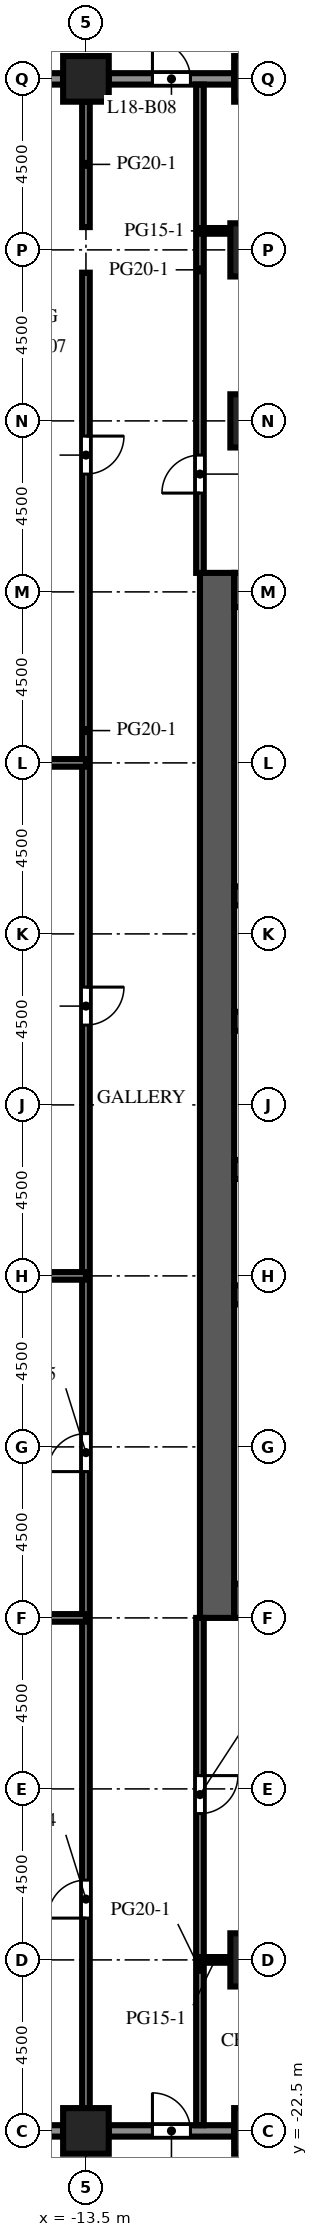
"""IFC4 building model, lengths in metres.
Left out: names, types, materials, properties, quantities, classifications, styles, units other than length and angle.
Written with IfcOpenShell. Run it as: python <this file> out.ifc"""

import sys

from ifc_helpers import new_model, si_unit, direction, frame, frame_2d, origin, origin_2d, place, context, subcontext, project, spatial, rectangle, extrude, element, fill, save


model = new_model("IFC4")
c1 = context("Model", 3, precision=1e-05, world=origin(), true_north=direction((0.0, 1.0)))
c2 = subcontext(c1, "Body", "Model", "MODEL_VIEW")
j1 = project(units=[si_unit("LENGTHUNIT", "METRE"), si_unit("PLANEANGLEUNIT", "RADIAN")], contexts=[c1])
p1 = place(None, origin())
s1 = spatial("IfcSite", under=j1, at=p1, CompositionType="ELEMENT")
p2 = place(p1, origin())
s2 = spatial("IfcBuilding", under=s1, at=p2, CompositionType="ELEMENT")
p3 = place(p2, frame((0.0, 0.0, 82.0)))
s3 = spatial("IfcBuildingStorey", under=s2, at=p3, CompositionType="ELEMENT", Elevation=82.0)
p4 = place(p3, frame((-13.5, -22.5, 0.0), z_axis=(0.0, 0.0, 1.0), x_axis=(1.0, 0.0, 0.0)))
e1 = element("IfcColumn", 1, at=p4, inside=s3, PredefinedType="COLUMN", context=c2, shape_type="SweptSolid", body=[
    extrude(rectangle(XDim=1.2, YDim=1.2, at=origin_2d()), origin(), (0.0, 0.0, 1.0), 4.1),
])
p5 = place(p3, frame((-13.5, 31.5, -0.45), z_axis=(0.0, 0.0, 1.0), x_axis=(1.0, 0.0, 0.0)))
e2 = element("IfcColumn", 2, at=p5, inside=s3, PredefinedType="COLUMN", context=c2, shape_type="SweptSolid", body=[
    extrude(rectangle(XDim=1.2, YDim=1.2, at=origin_2d()), origin(), (0.0, 0.0, 1.0), 4.55),
])
p6 = place(p3, frame((-9.0, -22.5, 0.0), z_axis=(0.0, 0.0, 1.0), x_axis=(1.0, 0.0, 0.0)))
e3 = element("IfcColumn", 3, at=p6, inside=s3, PredefinedType="COLUMN", context=c2, shape_type="SweptSolid", body=[
    extrude(rectangle(XDim=1.2, YDim=1.2, at=origin_2d()), origin(), (0.0, 0.0, 1.0), 4.1),
])
p7 = place(p3, frame((-9.0, 31.5, -0.45), z_axis=(0.0, 0.0, 1.0), x_axis=(1.0, 0.0, 0.0)))
e4 = element("IfcColumn", 4, at=p7, inside=s3, PredefinedType="COLUMN", context=c2, shape_type="SweptSolid", body=[
    extrude(rectangle(XDim=1.2, YDim=1.2, at=origin_2d()), origin(), (0.0, 0.0, 1.0), 4.55),
])
p8 = place(p3, frame((-9.0, -18.0, 0.0), z_axis=(0.0, 0.0, 1.0), x_axis=(1.0, 0.0, 0.0)))
e5 = element("IfcColumn", 5, at=p8, inside=s3, PredefinedType="COLUMN", context=c2, shape_type="SweptSolid", body=[
    extrude(rectangle(XDim=1.4, YDim=1.4, at=origin_2d()), origin(), (0.0, 0.0, 1.0), 4.1),
])
for number, where, z_axis, x_axis in (
    (6, (-9.0, 22.5, -0.45), (0.0, 0.0, 1.0), (1.0, 0.0, 0.0)),
    (7, (-9.0, 27.0, -0.45), (0.0, 0.0, 1.0), (1.0, 0.0, 0.0)),
):
    element("IfcColumn", number, at=place(p3, frame(where, z_axis=z_axis, x_axis=x_axis)), inside=s3, PredefinedType="COLUMN", context=c2, shape_type="SweptSolid", body=[
        extrude(rectangle(XDim=1.4, YDim=1.4, at=origin_2d()), origin(), (0.0, 0.0, 1.0), 4.55),
    ])
p9 = place(p3, frame((-10.05, -9.0, 0.0), z_axis=(0.0, 0.0, 1.0), x_axis=(0.0, 1.0, 0.0)))
e8 = element("IfcWall", 8, at=p9, inside=s3, PredefinedType="SHEAR", context=c2, shape_type="SweptSolid", body=[
    extrude(rectangle(XDim=27.5, YDim=0.9, at=frame_2d((13.75, 0.0))), origin(), (0.0, 0.0, 1.0), 4.1),
])
p10 = place(p9, frame((12.55, 0.0, 0.0)))
e9 = element("IfcOpeningElement", 9, at=p10, cuts=e8, PredefinedType="OPENING", context=c2, shape_type="SweptSolid", body=[
    extrude(rectangle(XDim=2.4, YDim=2.4, at=frame_2d((1.2, 1.2))), frame((0.0, 0.46, 0.0), z_axis=(0.0, -1.0, 0.0), x_axis=(1.0, 0.0, 0.0)), (0.0, 0.0, 1.0), 0.92),
])
p11 = place(p9, frame((6.825, 0.0, 0.0)))
e10 = element("IfcOpeningElement", 10, at=p11, cuts=e8, PredefinedType="OPENING", context=c2, shape_type="SweptSolid", body=[
    extrude(rectangle(XDim=1.2, YDim=2.1, at=frame_2d((0.6, 1.05))), frame((0.0, 0.46, 0.0), z_axis=(0.0, -1.0, 0.0), x_axis=(1.0, 0.0, 0.0)), (0.0, 0.0, 1.0), 0.92),
])
p12 = place(p9, frame((19.475, 0.0, 0.0)))
e11 = element("IfcOpeningElement", 11, at=p12, cuts=e8, PredefinedType="OPENING", context=c2, shape_type="SweptSolid", body=[
    extrude(rectangle(XDim=1.2, YDim=2.1, at=frame_2d((0.6, 1.05))), frame((0.0, 0.46, 0.0), z_axis=(0.0, -1.0, 0.0), x_axis=(1.0, 0.0, 0.0)), (0.0, 0.0, 1.0), 0.92),
])
for number, where, z_axis, x_axis in (
    (12, (-9.6, -8.55, 0.0), (0.0, 0.0, 1.0), (1.0, 0.0, 0.0)),
    (13, (-9.6, 18.05, 0.0), (0.0, 0.0, 1.0), (1.0, 0.0, 0.0)),
):
    element("IfcWall", number, at=place(p3, frame(where, z_axis=z_axis, x_axis=x_axis)), inside=s3, PredefinedType="SHEAR", context=c2, shape_type="SweptSolid", body=[
        extrude(rectangle(XDim=10.2, YDim=0.9, at=frame_2d((5.1, 0.0))), origin(), (0.0, 0.0, 1.0), 4.1),
    ])
p13 = place(p3, frame((-9.6, -0.5, 0.0), z_axis=(0.0, 0.0, 1.0), x_axis=(1.0, 0.0, 0.0)))
e14 = element("IfcWall", 14, at=p13, inside=s3, PredefinedType="SHEAR", context=c2, shape_type="SweptSolid", body=[
    extrude(rectangle(XDim=10.2, YDim=0.5, at=frame_2d((5.1, 0.0))), origin(), (0.0, 0.0, 1.0), 4.1),
])
p14 = place(p3, frame((-9.6, 2.8, 0.0), z_axis=(0.0, 0.0, 1.0), x_axis=(1.0, 0.0, 0.0)))
e15 = element("IfcWall", 15, at=p14, inside=s3, PredefinedType="SHEAR", context=c2, shape_type="SweptSolid", body=[
    extrude(rectangle(XDim=10.2, YDim=0.5, at=frame_2d((5.1, 0.0))), origin(), (0.0, 0.0, 1.0), 4.1),
])
p15 = place(p14, frame((0.562, 0.0, 0.0)))
e16 = element("IfcOpeningElement", 16, at=p15, cuts=e15, PredefinedType="OPENING", context=c2, shape_type="SweptSolid", body=[
    extrude(rectangle(XDim=1.1, YDim=2.1, at=frame_2d((0.55, 1.05))), frame((0.0, 0.26, 0.0), z_axis=(0.0, -1.0, 0.0), x_axis=(1.0, 0.0, 0.0)), (0.0, 0.0, 1.0), 0.52),
])
p16 = place(p14, frame((3.238, 0.0, 0.0)))
e17 = element("IfcOpeningElement", 17, at=p16, cuts=e15, PredefinedType="OPENING", context=c2, shape_type="SweptSolid", body=[
    extrude(rectangle(XDim=1.1, YDim=2.1, at=frame_2d((0.55, 1.05))), frame((0.0, 0.26, 0.0), z_axis=(0.0, -1.0, 0.0), x_axis=(1.0, 0.0, 0.0)), (0.0, 0.0, 1.0), 0.52),
])
p17 = place(p14, frame((8.538, 0.0, 0.0)))
e18 = element("IfcOpeningElement", 18, at=p17, cuts=e15, PredefinedType="OPENING", context=c2, shape_type="SweptSolid", body=[
    extrude(rectangle(XDim=1.1, YDim=2.1, at=frame_2d((0.55, 1.05))), frame((0.0, 0.26, 0.0), z_axis=(0.0, -1.0, 0.0), x_axis=(1.0, 0.0, 0.0)), (0.0, 0.0, 1.0), 0.52),
])
p18 = place(p3, frame((-9.6, 6.7, 0.0), z_axis=(0.0, 0.0, 1.0), x_axis=(1.0, 0.0, 0.0)))
e19 = element("IfcWall", 19, at=p18, inside=s3, PredefinedType="SHEAR", context=c2, shape_type="SweptSolid", body=[
    extrude(rectangle(XDim=10.2, YDim=0.5, at=frame_2d((5.1, 0.0))), origin(), (0.0, 0.0, 1.0), 4.1),
])
p19 = place(p18, frame((0.562, 0.0, 0.0)))
e20 = element("IfcOpeningElement", 20, at=p19, cuts=e19, PredefinedType="OPENING", context=c2, shape_type="SweptSolid", body=[
    extrude(rectangle(XDim=1.1, YDim=2.1, at=frame_2d((0.55, 1.05))), frame((0.0, 0.26, 0.0), z_axis=(0.0, -1.0, 0.0), x_axis=(1.0, 0.0, 0.0)), (0.0, 0.0, 1.0), 0.52),
])
p20 = place(p18, frame((3.288, 0.0, 0.0)))
e21 = element("IfcOpeningElement", 21, at=p20, cuts=e19, PredefinedType="OPENING", context=c2, shape_type="SweptSolid", body=[
    extrude(rectangle(XDim=1.0, YDim=2.1, at=frame_2d((0.5, 1.05))), frame((0.0, 0.26, 0.0), z_axis=(0.0, -1.0, 0.0), x_axis=(1.0, 0.0, 0.0)), (0.0, 0.0, 1.0), 0.52),
])
p21 = place(p18, frame((5.913, 0.0, 0.0)))
e22 = element("IfcOpeningElement", 22, at=p21, cuts=e19, PredefinedType="OPENING", context=c2, shape_type="SweptSolid", body=[
    extrude(rectangle(XDim=1.0, YDim=2.1, at=frame_2d((0.5, 1.05))), frame((0.0, 0.26, 0.0), z_axis=(0.0, -1.0, 0.0), x_axis=(1.0, 0.0, 0.0)), (0.0, 0.0, 1.0), 0.52),
])
p22 = place(p18, frame((8.587, 0.0, 0.0)))
e23 = element("IfcOpeningElement", 23, at=p22, cuts=e19, PredefinedType="OPENING", context=c2, shape_type="SweptSolid", body=[
    extrude(rectangle(XDim=1.0, YDim=2.1, at=frame_2d((0.5, 1.05))), frame((0.0, 0.26, 0.0), z_axis=(0.0, -1.0, 0.0), x_axis=(1.0, 0.0, 0.0)), (0.0, 0.0, 1.0), 0.52),
])
p23 = place(p3, frame((-9.6, 10.0, 0.0), z_axis=(0.0, 0.0, 1.0), x_axis=(1.0, 0.0, 0.0)))
e24 = element("IfcWall", 24, at=p23, inside=s3, PredefinedType="SHEAR", context=c2, shape_type="SweptSolid", body=[
    extrude(rectangle(XDim=10.2, YDim=0.5, at=frame_2d((5.1, 0.0))), origin(), (0.0, 0.0, 1.0), 4.1),
])
p24 = place(p3, frame((-14.1, -22.5, 0.0), z_axis=(0.0, 0.0, 1.0), x_axis=(-1.0, 0.0, 0.0)))
e25 = element("IfcWall", 25, at=p24, inside=s3, PredefinedType="SOLIDWALL", context=c2, shape_type="SweptSolid", body=[
    extrude(rectangle(XDim=3.3, YDim=0.3, at=frame_2d((1.65, 0.0))), origin(), (0.0, 0.0, 1.0), 2.75),
])
p25 = place(p24, frame((0.45, 0.0, 0.8)))
e26 = element("IfcOpeningElement", 26, at=p25, cuts=e25, PredefinedType="OPENING", context=c2, shape_type="SweptSolid", body=[
    extrude(rectangle(XDim=2.4, YDim=1.7, at=frame_2d((1.2, 0.85))), frame((0.0, 0.16, 0.0), z_axis=(0.0, -1.0, 0.0), x_axis=(1.0, 0.0, 0.0)), (0.0, 0.0, 1.0), 0.32),
])
p26 = place(p3, frame((-9.6, -22.5, 0.0), z_axis=(0.0, 0.0, 1.0), x_axis=(-1.0, 0.0, 0.0)))
e27 = element("IfcWall", 27, at=p26, inside=s3, PredefinedType="SOLIDWALL", context=c2, shape_type="SweptSolid", body=[
    extrude(rectangle(XDim=3.3, YDim=0.3, at=frame_2d((1.65, 0.0))), origin(), (0.0, 0.0, 1.0), 2.75),
])
p27 = place(p26, frame((1.15, 0.0, 0.0)))
e28 = element("IfcOpeningElement", 28, at=p27, cuts=e27, PredefinedType="OPENING", context=c2, shape_type="SweptSolid", body=[
    extrude(rectangle(XDim=1.0, YDim=2.2, at=frame_2d((0.5, 1.1))), frame((0.0, 0.16, 0.0), z_axis=(0.0, -1.0, 0.0), x_axis=(1.0, 0.0, 0.0)), (0.0, 0.0, 1.0), 0.32),
])
p28 = place(p3, frame((-12.9, 31.5, 0.0), z_axis=(0.0, 0.0, 1.0), x_axis=(1.0, 0.0, 0.0)))
e29 = element("IfcWall", 29, at=p28, inside=s3, PredefinedType="SOLIDWALL", context=c2, shape_type="SweptSolid", body=[
    extrude(rectangle(XDim=3.3, YDim=0.3, at=frame_2d((1.65, 0.0))), origin(), (0.0, 0.0, 1.0), 2.75),
])
p29 = place(p28, frame((1.15, 0.0, 0.0)))
e30 = element("IfcOpeningElement", 30, at=p29, cuts=e29, PredefinedType="OPENING", context=c2, shape_type="SweptSolid", body=[
    extrude(rectangle(XDim=1.0, YDim=2.2, at=frame_2d((0.5, 1.1))), frame((0.0, 0.16, 0.0), z_axis=(0.0, -1.0, 0.0), x_axis=(1.0, 0.0, 0.0)), (0.0, 0.0, 1.0), 0.32),
])
p30 = place(p3, frame((-17.4, 31.5, 0.0), z_axis=(0.0, 0.0, 1.0), x_axis=(1.0, 0.0, 0.0)))
e31 = element("IfcWall", 31, at=p30, inside=s3, PredefinedType="SOLIDWALL", context=c2, shape_type="SweptSolid", body=[
    extrude(rectangle(XDim=3.3, YDim=0.3, at=frame_2d((1.65, 0.0))), origin(), (0.0, 0.0, 1.0), 2.75),
])
p31 = place(p30, frame((0.45, 0.0, 0.8)))
e32 = element("IfcOpeningElement", 32, at=p31, cuts=e31, PredefinedType="OPENING", context=c2, shape_type="SweptSolid", body=[
    extrude(rectangle(XDim=2.4, YDim=1.7, at=frame_2d((1.2, 0.85))), frame((0.0, 0.16, 0.0), z_axis=(0.0, -1.0, 0.0), x_axis=(1.0, 0.0, 0.0)), (0.0, 0.0, 1.0), 0.32),
])
p32 = place(p3, frame((-13.5, -21.9, 0.0), z_axis=(0.0, 0.0, 1.0), x_axis=(0.0, 1.0, 0.0)))
e33 = element("IfcWall", 33, at=p32, inside=s3, PredefinedType="PARTITIONING", context=c2, shape_type="SweptSolid", body=[
    extrude(rectangle(XDim=48.3, YDim=0.2, at=frame_2d((24.15, 0.0))), origin(), (0.0, 0.0, 1.0), 3.65),
])
p33 = place(p32, frame((5.0, 0.0, 0.0)))
e34 = element("IfcOpeningElement", 34, at=p33, cuts=e33, PredefinedType="OPENING", context=c2, shape_type="SweptSolid", body=[
    extrude(rectangle(XDim=1.0, YDim=2.1, at=frame_2d((0.5, 1.05))), frame((0.0, 0.11, 0.0), z_axis=(0.0, -1.0, 0.0), x_axis=(1.0, 0.0, 0.0)), (0.0, 0.0, 1.0), 0.22),
])
p34 = place(p32, frame((16.75, 0.0, 0.0)))
e35 = element("IfcOpeningElement", 35, at=p34, cuts=e33, PredefinedType="OPENING", context=c2, shape_type="SweptSolid", body=[
    extrude(rectangle(XDim=1.0, YDim=2.1, at=frame_2d((0.5, 1.05))), frame((0.0, 0.11, 0.0), z_axis=(0.0, -1.0, 0.0), x_axis=(1.0, 0.0, 0.0)), (0.0, 0.0, 1.0), 0.22),
])
p35 = place(p32, frame((28.5, 0.0, 0.0)))
e36 = element("IfcOpeningElement", 36, at=p35, cuts=e33, PredefinedType="OPENING", context=c2, shape_type="SweptSolid", body=[
    extrude(rectangle(XDim=1.0, YDim=2.1, at=frame_2d((0.5, 1.05))), frame((0.0, 0.11, 0.0), z_axis=(0.0, -1.0, 0.0), x_axis=(1.0, 0.0, 0.0)), (0.0, 0.0, 1.0), 0.22),
])
p36 = place(p32, frame((43.0, 0.0, 0.0)))
e37 = element("IfcOpeningElement", 37, at=p36, cuts=e33, PredefinedType="OPENING", context=c2, shape_type="SweptSolid", body=[
    extrude(rectangle(XDim=1.0, YDim=2.1, at=frame_2d((0.5, 1.05))), frame((0.0, 0.11, 0.0), z_axis=(0.0, -1.0, 0.0), x_axis=(1.0, 0.0, 0.0)), (0.0, 0.0, 1.0), 0.22),
])
p37 = place(p3, frame((-13.5, 27.6, 0.0), z_axis=(0.0, 0.0, 1.0), x_axis=(0.0, 1.0, 0.0)))
e38 = element("IfcWall", 38, at=p37, inside=s3, PredefinedType="PARTITIONING", context=c2, shape_type="SweptSolid", body=[
    extrude(rectangle(XDim=3.3, YDim=0.2, at=frame_2d((1.65, 0.0))), origin(), (0.0, 0.0, 1.0), 3.65),
])
p38 = place(p3, frame((-10.5, -9.0, 0.0), z_axis=(0.0, 0.0, 1.0), x_axis=(0.0, -1.0, 0.0)))
e39 = element("IfcWall", 39, at=p38, inside=s3, PredefinedType="PARTITIONING", context=c2, shape_type="SweptSolid", body=[
    extrude(rectangle(XDim=13.35, YDim=0.2, at=frame_2d((6.675, 0.0))), origin(), (0.0, 0.0, 1.0), 3.65),
])
p39 = place(p38, frame((4.15, 0.0, 0.0)))
e40 = element("IfcOpeningElement", 40, at=p39, cuts=e39, PredefinedType="OPENING", context=c2, shape_type="SweptSolid", body=[
    extrude(rectangle(XDim=1.0, YDim=2.1, at=frame_2d((0.5, 1.05))), frame((0.0, 0.11, 0.0), z_axis=(0.0, -1.0, 0.0), x_axis=(1.0, 0.0, 0.0)), (0.0, 0.0, 1.0), 0.22),
])
p40 = place(p3, frame((-10.5, 31.35, 0.0), z_axis=(0.0, 0.0, 1.0), x_axis=(0.0, -1.0, 0.0)))
e41 = element("IfcWall", 41, at=p40, inside=s3, PredefinedType="PARTITIONING", context=c2, shape_type="SweptSolid", body=[
    extrude(rectangle(XDim=12.85, YDim=0.2, at=frame_2d((6.425, 0.0))), origin(), (0.0, 0.0, 1.0), 3.65),
])
p41 = place(p40, frame((9.75, 0.0, 0.0)))
e42 = element("IfcOpeningElement", 42, at=p41, cuts=e41, PredefinedType="OPENING", context=c2, shape_type="SweptSolid", body=[
    extrude(rectangle(XDim=1.0, YDim=2.1, at=frame_2d((0.5, 1.05))), frame((0.0, 0.11, 0.0), z_axis=(0.0, -1.0, 0.0), x_axis=(1.0, 0.0, 0.0)), (0.0, 0.0, 1.0), 0.22),
])
p42 = place(p3, frame((-10.5, -18.0, 0.0), z_axis=(0.0, 0.0, 1.0), x_axis=(1.0, 0.0, 0.0)))
e43 = element("IfcWall", 43, at=p42, inside=s3, PredefinedType="PARTITIONING", context=c2, shape_type="SweptSolid", body=[
    extrude(rectangle(XDim=0.8, YDim=0.15, at=frame_2d((0.4, 0.0))), origin(), (0.0, 0.0, 1.0), 3.65),
])
for number, where, z_axis, x_axis in (
    (44, (-17.3, -9.0, 0.0), (0.0, 0.0, 1.0), (1.0, 0.0, 0.0)),
    (45, (-17.3, 0.0, 0.0), (0.0, 0.0, 1.0), (1.0, 0.0, 0.0)),
):
    element("IfcWall", number, at=place(p3, frame(where, z_axis=z_axis, x_axis=x_axis)), inside=s3, PredefinedType="PARTITIONING", context=c2, shape_type="SweptSolid", body=[
        extrude(rectangle(XDim=3.8, YDim=0.2, at=frame_2d((1.9, 0.0))), origin(), (0.0, 0.0, 1.0), 3.65),
    ])
p43 = place(p3, frame((-21.9, 13.5, 0.0), z_axis=(0.0, 0.0, 1.0), x_axis=(1.0, 0.0, 0.0)))
e46 = element("IfcWall", 46, at=p43, inside=s3, PredefinedType="PARTITIONING", context=c2, shape_type="SweptSolid", body=[
    extrude(rectangle(XDim=8.4, YDim=0.2, at=frame_2d((4.2, 0.0))), origin(), (0.0, 0.0, 1.0), 3.65),
])
p44 = place(p3, frame((-10.5, 27.5, 0.0), z_axis=(0.0, 0.0, 1.0), x_axis=(1.0, 0.0, 0.0)))
e47 = element("IfcWall", 47, at=p44, inside=s3, PredefinedType="PARTITIONING", context=c2, shape_type="SweptSolid", body=[
    extrude(rectangle(XDim=0.8, YDim=0.15, at=frame_2d((0.4, 0.0))), origin(), (0.0, 0.0, 1.0), 3.65),
])
p45 = place(p27, origin())
e48 = element("IfcDoor", 48, at=p45, inside=s3, OperationType="SINGLE_SWING_RIGHT", PredefinedType="DOOR", context=c2, shape_type="SweptSolid", body=[
    extrude(rectangle(XDim=1.0, YDim=2.2, at=frame_2d((0.5, 1.1))), frame((0.0, 0.025, 0.0), z_axis=(0.0, -1.0, 0.0), x_axis=(1.0, 0.0, 0.0)), (0.0, 0.0, 1.0), 0.05),
])
fill(e28, e48)
p46 = place(p29, origin())
e49 = element("IfcDoor", 49, at=p46, inside=s3, OperationType="SINGLE_SWING_LEFT", PredefinedType="DOOR", context=c2, shape_type="SweptSolid", body=[
    extrude(rectangle(XDim=1.0, YDim=2.2, at=frame_2d((0.5, 1.1))), frame((0.0, 0.025, 0.0), z_axis=(0.0, -1.0, 0.0), x_axis=(1.0, 0.0, 0.0)), (0.0, 0.0, 1.0), 0.05),
])
fill(e30, e49)
p47 = place(p10, origin())
e50 = element("IfcDoor", 50, at=p47, inside=s3, OperationType="DOUBLE_DOOR_DOUBLE_SWING", PredefinedType="DOOR", context=c2, shape_type="SweptSolid", body=[
    extrude(rectangle(XDim=2.4, YDim=2.4, at=frame_2d((1.2, 1.2))), frame((0.0, 0.025, 0.0), z_axis=(0.0, -1.0, 0.0), x_axis=(1.0, 0.0, 0.0)), (0.0, 0.0, 1.0), 0.05),
])
fill(e9, e50)
p48 = place(p11, origin())
e51 = element("IfcDoor", 51, at=p48, inside=s3, OperationType="SINGLE_SWING_LEFT", PredefinedType="DOOR", context=c2, shape_type="SweptSolid", body=[
    extrude(rectangle(XDim=1.2, YDim=2.1, at=frame_2d((0.6, 1.05))), frame((0.0, 0.025, 0.0), z_axis=(0.0, -1.0, 0.0), x_axis=(1.0, 0.0, 0.0)), (0.0, 0.0, 1.0), 0.05),
])
fill(e10, e51)
p49 = place(p12, origin())
e52 = element("IfcDoor", 52, at=p49, inside=s3, OperationType="SINGLE_SWING_LEFT", PredefinedType="DOOR", context=c2, shape_type="SweptSolid", body=[
    extrude(rectangle(XDim=1.2, YDim=2.1, at=frame_2d((0.6, 1.05))), frame((0.0, 0.025, 0.0), z_axis=(0.0, -1.0, 0.0), x_axis=(1.0, 0.0, 0.0)), (0.0, 0.0, 1.0), 0.05),
])
fill(e11, e52)
p50 = place(p33, origin())
e53 = element("IfcDoor", 53, at=p50, inside=s3, OperationType="SINGLE_SWING_LEFT", PredefinedType="DOOR", context=c2, shape_type="SweptSolid", body=[
    extrude(rectangle(XDim=1.0, YDim=2.1, at=frame_2d((0.5, 1.05))), frame((0.0, 0.025, 0.0), z_axis=(0.0, -1.0, 0.0), x_axis=(1.0, 0.0, 0.0)), (0.0, 0.0, 1.0), 0.05),
])
fill(e34, e53)
p51 = place(p34, origin())
e54 = element("IfcDoor", 54, at=p51, inside=s3, OperationType="SINGLE_SWING_LEFT", PredefinedType="DOOR", context=c2, shape_type="SweptSolid", body=[
    extrude(rectangle(XDim=1.0, YDim=2.1, at=frame_2d((0.5, 1.05))), frame((0.0, 0.025, 0.0), z_axis=(0.0, -1.0, 0.0), x_axis=(1.0, 0.0, 0.0)), (0.0, 0.0, 1.0), 0.05),
])
fill(e35, e54)
p52 = place(p35, origin())
e55 = element("IfcDoor", 55, at=p52, inside=s3, OperationType="SINGLE_SWING_RIGHT", PredefinedType="DOOR", context=c2, shape_type="SweptSolid", body=[
    extrude(rectangle(XDim=1.0, YDim=2.1, at=frame_2d((0.5, 1.05))), frame((0.0, 0.025, 0.0), z_axis=(0.0, -1.0, 0.0), x_axis=(1.0, 0.0, 0.0)), (0.0, 0.0, 1.0), 0.05),
])
fill(e36, e55)
p53 = place(p36, origin())
e56 = element("IfcDoor", 56, at=p53, inside=s3, OperationType="SINGLE_SWING_RIGHT", PredefinedType="DOOR", context=c2, shape_type="SweptSolid", body=[
    extrude(rectangle(XDim=1.0, YDim=2.1, at=frame_2d((0.5, 1.05))), frame((0.0, 0.025, 0.0), z_axis=(0.0, -1.0, 0.0), x_axis=(1.0, 0.0, 0.0)), (0.0, 0.0, 1.0), 0.05),
])
fill(e37, e56)
p54 = place(p39, origin())
e57 = element("IfcDoor", 57, at=p54, inside=s3, OperationType="SINGLE_SWING_LEFT", PredefinedType="DOOR", context=c2, shape_type="SweptSolid", body=[
    extrude(rectangle(XDim=1.0, YDim=2.1, at=frame_2d((0.5, 1.05))), frame((0.0, 0.025, 0.0), z_axis=(0.0, -1.0, 0.0), x_axis=(1.0, 0.0, 0.0)), (0.0, 0.0, 1.0), 0.05),
])
fill(e40, e57)
p55 = place(p41, origin())
e58 = element("IfcDoor", 58, at=p55, inside=s3, OperationType="SINGLE_SWING_RIGHT", PredefinedType="DOOR", context=c2, shape_type="SweptSolid", body=[
    extrude(rectangle(XDim=1.0, YDim=2.1, at=frame_2d((0.5, 1.05))), frame((0.0, 0.025, 0.0), z_axis=(0.0, -1.0, 0.0), x_axis=(1.0, 0.0, 0.0)), (0.0, 0.0, 1.0), 0.05),
])
fill(e42, e58)
save(model, sys.argv[1])
